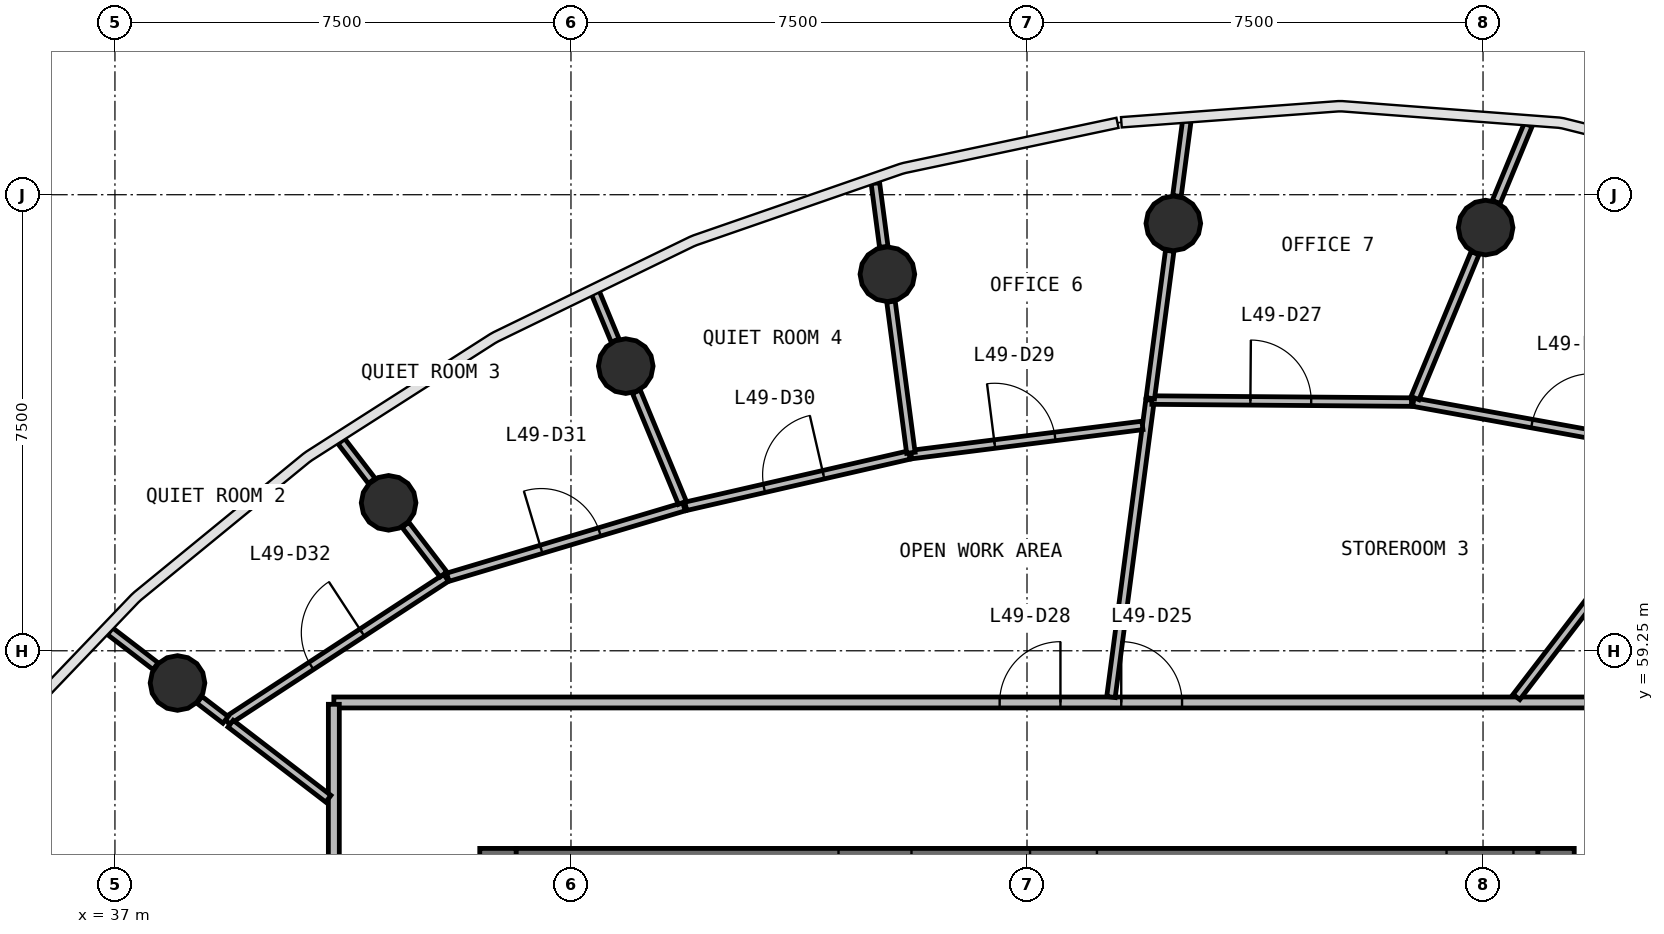
"""IFC4 building model, lengths in metres.
Left out: names, types, materials, properties, quantities, classifications, styles, units other than length and angle.
Written with IfcOpenShell. Run it as: python <this file> out.ifc"""

import sys

from ifc_helpers import new_model, si_unit, direction, frame, frame_2d, origin, origin_2d, place, context, subcontext, project, spatial, rectangle, circle, extrude, source, transform, mapped, element, fill, save


model = new_model("IFC4")
c1 = context("Model", 3, precision=1e-05, world=origin(), true_north=direction((0.0, 1.0)))
c2 = subcontext(c1, "Body", "Model", "MODEL_VIEW")
j1 = project(units=[si_unit("LENGTHUNIT", "METRE"), si_unit("PLANEANGLEUNIT", "RADIAN")], contexts=[c1])
p1 = place(None, origin())
s1 = spatial("IfcSite", under=j1, at=p1, CompositionType="ELEMENT")
p2 = place(p1, origin())
s2 = spatial("IfcBuilding", under=s1, at=p2, CompositionType="ELEMENT")
p3 = place(p2, frame((0.0, 0.0, 203.3)))
s3 = spatial("IfcBuildingStorey", under=s2, at=p3, CompositionType="ELEMENT", Elevation=203.3)
p4 = place(p3, frame((60.7, 40.0, 0.0), z_axis=(0.0, 0.0, 1.0), x_axis=(0.0, 1.0, 0.0)))
e1 = element("IfcWall", 1, at=p4, inside=s3, PredefinedType="SHEAR", context=c2, shape_type="SweptSolid", body=[
    extrude(rectangle(XDim=16.0, YDim=0.6, at=frame_2d((8.0, 0.0))), origin(), (0.0, 0.0, 1.0), 3.9),
])
p5 = place(p4, frame((7.1, 0.0, 0.0)))
e2 = element("IfcOpeningElement", 2, at=p5, cuts=e1, PredefinedType="OPENING", context=c2, shape_type="SweptSolid", body=[
    extrude(rectangle(XDim=1.8, YDim=2.1, at=frame_2d((0.9, 1.05))), frame((0.0, 0.31, 0.0), z_axis=(0.0, -1.0, 0.0), x_axis=(1.0, 0.0, 0.0)), (0.0, 0.0, 1.0), 0.62),
])
p6 = place(p3, frame((43.3, 56.0, 0.0), z_axis=(0.0, 0.0, 1.0), x_axis=(0.0, -1.0, 0.0)))
e3 = element("IfcWall", 3, at=p6, inside=s3, PredefinedType="SHEAR", context=c2, shape_type="SweptSolid", body=[
    extrude(rectangle(XDim=16.0, YDim=0.6, at=frame_2d((8.0, 0.0))), origin(), (0.0, 0.0, 1.0), 3.9),
])
p7 = place(p6, frame((7.1, 0.0, 0.0)))
e4 = element("IfcOpeningElement", 4, at=p7, cuts=e3, PredefinedType="OPENING", context=c2, shape_type="SweptSolid", body=[
    extrude(rectangle(XDim=1.8, YDim=2.1, at=frame_2d((0.9, 1.05))), frame((0.0, 0.31, 0.0), z_axis=(0.0, -1.0, 0.0), x_axis=(1.0, 0.0, 0.0)), (0.0, 0.0, 1.0), 0.62),
])
p8 = place(p3, frame((60.4, 55.7, 0.0), z_axis=(0.0, 0.0, 1.0), x_axis=(-1.0, 0.0, 0.0)))
e5 = element("IfcWall", 5, at=p8, inside=s3, PredefinedType="SHEAR", context=c2, shape_type="SweptSolid", body=[
    extrude(rectangle(XDim=16.8, YDim=0.6, at=frame_2d((8.4, 0.0))), origin(), (0.0, 0.0, 1.0), 3.9),
])
p9 = place(p8, frame((0.4, 0.0, 0.0)))
e6 = element("IfcOpeningElement", 6, at=p9, cuts=e5, PredefinedType="OPENING", context=c2, shape_type="SweptSolid", body=[
    extrude(rectangle(XDim=1.1, YDim=2.1, at=frame_2d((0.55, 1.05))), frame((0.0, 0.31, 0.0), z_axis=(0.0, -1.0, 0.0), x_axis=(1.0, 0.0, 0.0)), (0.0, 0.0, 1.0), 0.62),
])
p10 = place(p8, frame((10.3, 0.0, 0.0)))
e7 = element("IfcOpeningElement", 7, at=p10, cuts=e5, PredefinedType="OPENING", context=c2, shape_type="SweptSolid", body=[
    extrude(rectangle(XDim=1.2, YDim=2.1, at=frame_2d((0.6, 1.05))), frame((0.0, 0.31, 0.0), z_axis=(0.0, -1.0, 0.0), x_axis=(1.0, 0.0, 0.0)), (0.0, 0.0, 1.0), 0.62),
])
p11 = place(p8, frame((7.25, 0.0, 0.0)))
e8 = element("IfcOpeningElement", 8, at=p11, cuts=e5, PredefinedType="OPENING", context=c2, shape_type="SweptSolid", body=[
    extrude(rectangle(XDim=1.1, YDim=2.1, at=frame_2d((0.55, 1.05))), frame((0.0, 0.31, 0.0), z_axis=(0.0, -1.0, 0.0), x_axis=(1.0, 0.0, 0.0)), (0.0, 0.0, 1.0), 0.62),
])
m1 = source(origin(), c2, "Body", "SweptSolid", [
    extrude(circle(Radius=0.45, at=origin_2d()), origin(), (0.0, 0.0, 1.0), 3.9),
])
for number, where, z_axis, x_axis in (
    (9, (59.543, 66.21, 0.0), (0.0, 0.0, 1.0), (1.0, 0.0, 0.0)),
    (10, (54.406, 66.278, 0.0), (0.0, 0.0, 1.0), (1.0, 0.0, 0.0)),
    (11, (49.704, 65.442, 0.0), (0.0, 0.0, 1.0), (1.0, 0.0, 0.0)),
    (12, (45.401, 63.931, 0.0), (0.0, 0.0, 1.0), (1.0, 0.0, 0.0)),
    (13, (41.501, 61.683, 0.0), (0.0, 0.0, 1.0), (1.0, 0.0, 0.0)),
    (14, (38.029, 58.72, 0.0), (0.0, 0.0, 1.0), (1.0, 0.0, 0.0)),
):
    element("IfcColumn", number, at=place(p3, frame(where, z_axis=z_axis, x_axis=x_axis)), inside=s3, PredefinedType="COLUMN", context=c2, shape_type="MappedRepresentation", body=[
        mapped(m1, transform((0.0, 0.0, 0.0), scale=1.0)),
    ])
p12 = place(p3, frame((40.6, 58.4, 0.0), z_axis=(0.0, 0.0, 1.0), x_axis=(1.0, 0.0, 0.0)))
e15 = element("IfcWall", 15, at=p12, inside=s3, PredefinedType="PARTITIONING", context=c2, shape_type="SweptSolid", body=[
    extrude(rectangle(XDim=22.8, YDim=0.18, at=frame_2d((11.4, 0.0))), origin(), (0.0, 0.0, 1.0), 2.88),
])
p13 = place(p12, frame((12.95, 0.0, 0.0)))
e16 = element("IfcOpeningElement", 16, at=p13, cuts=e15, PredefinedType="OPENING", context=c2, shape_type="SweptSolid", body=[
    extrude(rectangle(XDim=1.0, YDim=2.1, at=frame_2d((0.5, 1.05))), frame((0.0, 0.1, 0.0), z_axis=(0.0, -1.0, 0.0), x_axis=(1.0, 0.0, 0.0)), (0.0, 0.0, 1.0), 0.2),
])
p14 = place(p12, frame((10.95, 0.0, 0.0)))
e17 = element("IfcOpeningElement", 17, at=p14, cuts=e15, PredefinedType="OPENING", context=c2, shape_type="SweptSolid", body=[
    extrude(rectangle(XDim=1.0, YDim=2.1, at=frame_2d((0.5, 1.05))), frame((0.0, 0.1, 0.0), z_axis=(0.0, -1.0, 0.0), x_axis=(1.0, 0.0, 0.0)), (0.0, 0.0, 1.0), 0.2),
])
p15 = place(p3, frame((40.6, 37.63, 0.0), z_axis=(0.0, 0.0, 1.0), x_axis=(0.0, 1.0, 0.0)))
e18 = element("IfcWall", 18, at=p15, inside=s3, PredefinedType="PARTITIONING", context=c2, shape_type="SweptSolid", body=[
    extrude(rectangle(XDim=20.74, YDim=0.18, at=frame_2d((10.37, 0.0))), origin(), (0.0, 0.0, 1.0), 2.88),
])
p16 = place(p15, frame((9.89, 0.0, 0.0)))
e19 = element("IfcOpeningElement", 19, at=p16, cuts=e18, PredefinedType="OPENING", context=c2, shape_type="SweptSolid", body=[
    extrude(rectangle(XDim=1.0, YDim=2.1, at=frame_2d((0.5, 1.05))), frame((0.0, 0.1, 0.0), z_axis=(0.0, -1.0, 0.0), x_axis=(1.0, 0.0, 0.0)), (0.0, 0.0, 1.0), 0.2),
])
p17 = place(p15, frame((4.29, 0.0, 0.0)))
e20 = element("IfcOpeningElement", 20, at=p17, cuts=e18, PredefinedType="OPENING", context=c2, shape_type="SweptSolid", body=[
    extrude(rectangle(XDim=1.0, YDim=2.1, at=frame_2d((0.5, 1.05))), frame((0.0, 0.1, 0.0), z_axis=(0.0, -1.0, 0.0), x_axis=(1.0, 0.0, 0.0)), (0.0, 0.0, 1.0), 0.2),
])
p18 = place(p3, frame((53.381, 58.49, 0.0), z_axis=(0.0, 0.0, 1.0), x_axis=(0.130510929427, 0.991446870639, 0.0)))
e21 = element("IfcWall", 21, at=p18, inside=s3, PredefinedType="PARTITIONING", context=c2, shape_type="SweptSolid", body=[
    extrude(rectangle(XDim=4.926, YDim=0.14, at=frame_2d((2.463, 0.0))), origin(), (0.0, 0.0, 1.0), 2.88),
])
p19 = place(p3, frame((58.354, 63.339, 0.0), z_axis=(0.0, 0.0, 1.0), x_axis=(0.983980456021, -0.178276364581, 0.0)))
e22 = element("IfcWall", 22, at=p19, inside=s3, PredefinedType="PARTITIONING", context=c2, shape_type="SweptSolid", body=[
    extrude(rectangle(XDim=4.833, YDim=0.14, at=frame_2d((2.417, 0.0))), origin(), (0.0, 0.0, 1.0), 2.88),
])
p20 = place(p19, frame((1.983, 0.0, 0.0)))
e23 = element("IfcOpeningElement", 23, at=p20, cuts=e22, PredefinedType="OPENING", context=c2, shape_type="SweptSolid", body=[
    extrude(rectangle(XDim=1.0, YDim=2.1, at=frame_2d((0.5, 1.05))), frame((0.0, 0.08, 0.0), z_axis=(0.0, -1.0, 0.0), x_axis=(1.0, 0.0, 0.0)), (0.0, 0.0, 1.0), 0.16),
])
p21 = place(p3, frame((54.054, 63.373, 0.0), z_axis=(0.0, 0.0, 1.0), x_axis=(0.999969319587, -0.007833255005, 0.0)))
e24 = element("IfcWall", 24, at=p21, inside=s3, PredefinedType="PARTITIONING", context=c2, shape_type="SweptSolid", body=[
    extrude(rectangle(XDim=4.27, YDim=0.14, at=frame_2d((2.135, 0.0))), origin(), (0.0, 0.0, 1.0), 2.88),
])
p22 = place(p21, frame((1.62, 0.0, 0.0)))
e25 = element("IfcOpeningElement", 25, at=p22, cuts=e24, PredefinedType="OPENING", context=c2, shape_type="SweptSolid", body=[
    extrude(rectangle(XDim=1.0, YDim=2.1, at=frame_2d((0.5, 1.05))), frame((0.0, 0.08, 0.0), z_axis=(0.0, -1.0, 0.0), x_axis=(1.0, 0.0, 0.0)), (0.0, 0.0, 1.0), 0.16),
])
p23 = place(p3, frame((38.843, 58.096, 0.0), z_axis=(0.0, 0.0, 1.0), x_axis=(0.83707650684, 0.547085844907, 0.0)))
e26 = element("IfcWall", 26, at=p23, inside=s3, PredefinedType="PARTITIONING", context=c2, shape_type="SweptSolid", body=[
    extrude(rectangle(XDim=4.305, YDim=0.14, at=frame_2d((2.152, 0.0))), origin(), (0.0, 0.0, 1.0), 2.88),
])
p24 = place(p23, frame((1.655, 0.0, 0.0)))
e27 = element("IfcOpeningElement", 27, at=p24, cuts=e26, PredefinedType="OPENING", context=c2, shape_type="SweptSolid", body=[
    extrude(rectangle(XDim=1.0, YDim=2.1, at=frame_2d((0.5, 1.05))), frame((0.0, 0.08, 0.0), z_axis=(0.0, -1.0, 0.0), x_axis=(1.0, 0.0, 0.0)), (0.0, 0.0, 1.0), 0.16),
])
p25 = place(p3, frame((42.475, 60.459, 0.0), z_axis=(0.0, 0.0, 1.0), x_axis=(0.958218274214, 0.286038002655, 0.0)))
e28 = element("IfcWall", 28, at=p25, inside=s3, PredefinedType="PARTITIONING", context=c2, shape_type="SweptSolid", body=[
    extrude(rectangle(XDim=4.053, YDim=0.14, at=frame_2d((2.027, 0.0))), origin(), (0.0, 0.0, 1.0), 2.88),
])
p26 = place(p25, frame((1.603, 0.0, 0.0)))
e29 = element("IfcOpeningElement", 29, at=p26, cuts=e28, PredefinedType="OPENING", context=c2, shape_type="SweptSolid", body=[
    extrude(rectangle(XDim=1.0, YDim=2.1, at=frame_2d((0.5, 1.05))), frame((0.0, 0.08, 0.0), z_axis=(0.0, -1.0, 0.0), x_axis=(1.0, 0.0, 0.0)), (0.0, 0.0, 1.0), 0.16),
])
p27 = place(p3, frame((50.094, 62.476, 0.0), z_axis=(0.0, 0.0, 1.0), x_axis=(0.99213420041, 0.12517878565, 0.0)))
e30 = element("IfcWall", 30, at=p27, inside=s3, PredefinedType="PARTITIONING", context=c2, shape_type="SweptSolid", body=[
    extrude(rectangle(XDim=3.834, YDim=0.14, at=frame_2d((1.917, 0.0))), origin(), (0.0, 0.0, 1.0), 2.88),
])
p28 = place(p27, frame((1.385, 0.0, 0.0)))
e31 = element("IfcOpeningElement", 31, at=p28, cuts=e30, PredefinedType="OPENING", context=c2, shape_type="SweptSolid", body=[
    extrude(rectangle(XDim=1.0, YDim=2.1, at=frame_2d((0.5, 1.05))), frame((0.0, 0.08, 0.0), z_axis=(0.0, -1.0, 0.0), x_axis=(1.0, 0.0, 0.0)), (0.0, 0.0, 1.0), 0.16),
])
p29 = place(p3, frame((46.388, 61.626, 0.0), z_axis=(0.0, 0.0, 1.0), x_axis=(0.974668578249, 0.223654113699, 0.0)))
e32 = element("IfcWall", 32, at=p29, inside=s3, PredefinedType="PARTITIONING", context=c2, shape_type="SweptSolid", body=[
    extrude(rectangle(XDim=3.772, YDim=0.14, at=frame_2d((1.886, 0.0))), origin(), (0.0, 0.0, 1.0), 2.88),
])
p30 = place(p29, frame((1.323, 0.0, 0.0)))
e33 = element("IfcOpeningElement", 33, at=p30, cuts=e32, PredefinedType="OPENING", context=c2, shape_type="SweptSolid", body=[
    extrude(rectangle(XDim=1.0, YDim=2.1, at=frame_2d((0.5, 1.05))), frame((0.0, 0.08, 0.0), z_axis=(0.0, -1.0, 0.0), x_axis=(1.0, 0.0, 0.0)), (0.0, 0.0, 1.0), 0.16),
])
p31 = place(p3, frame((60.049, 58.49, 0.0), z_axis=(0.0, 0.0, 1.0), x_axis=(0.60875050296, 0.793361724024, 0.0)))
e34 = element("IfcWall", 34, at=p31, inside=s3, PredefinedType="PARTITIONING", context=c2, shape_type="SweptSolid", body=[
    extrude(rectangle(XDim=3.663, YDim=0.14, at=frame_2d((1.832, 0.0))), origin(), (0.0, 0.0, 1.0), 2.88),
])
p32 = place(p3, frame((54.028, 63.403, 0.0), z_axis=(0.0, 0.0, 1.0), x_axis=(0.130581052229, 0.991437637373, 0.0)))
e35 = element("IfcWall", 35, at=p32, inside=s3, PredefinedType="PARTITIONING", context=c2, shape_type="SweptSolid", body=[
    extrude(rectangle(XDim=2.446, YDim=0.14, at=frame_2d((1.223, 0.0))), origin(), (0.0, 0.0, 1.0), 2.88),
])
p33 = place(p3, frame((38.39, 58.444, 0.0), z_axis=(0.0, 0.0, 1.0), x_axis=(0.793294129055, -0.608838586825, 0.0)))
e36 = element("IfcWall", 36, at=p33, inside=s3, PredefinedType="PARTITIONING", context=c2, shape_type="SweptSolid", body=[
    extrude(rectangle(XDim=0.541, YDim=0.14, at=frame_2d((0.271, 0.0))), origin(), (0.0, 0.0, 1.0), 2.88),
])
p34 = place(p3, frame((38.902, 58.051, 0.0), z_axis=(0.0, 0.0, 1.0), x_axis=(0.7933756116, -0.608732403374, 0.0)))
e37 = element("IfcWall", 37, at=p34, inside=s3, PredefinedType="PARTITIONING", context=c2, shape_type="SweptSolid", body=[
    extrude(rectangle(XDim=2.027, YDim=0.14, at=frame_2d((1.013, 0.0))), origin(), (0.0, 0.0, 1.0), 2.88),
])
p35 = place(p3, frame((58.381, 63.406, 0.0), z_axis=(0.0, 0.0, 1.0), x_axis=(0.382733405642, 0.923858831319, 0.0)))
e38 = element("IfcWall", 38, at=p35, inside=s3, PredefinedType="PARTITIONING", context=c2, shape_type="SweptSolid", body=[
    extrude(rectangle(XDim=2.58, YDim=0.14, at=frame_2d((1.29, 0.0))), origin(), (0.0, 0.0, 1.0), 2.88),
])
p36 = place(p3, frame((50.09, 62.506, 0.0), z_axis=(0.0, 0.0, 1.0), x_axis=(-0.130479700893, 0.991450980964, 0.0)))
e39 = element("IfcWall", 39, at=p36, inside=s3, PredefinedType="PARTITIONING", context=c2, shape_type="SweptSolid", body=[
    extrude(rectangle(XDim=2.507, YDim=0.14, at=frame_2d((1.254, 0.0))), origin(), (0.0, 0.0, 1.0), 2.88),
])
p37 = place(p3, frame((46.332, 61.684, 0.0), z_axis=(0.0, 0.0, 1.0), x_axis=(-0.382624406385, 0.923903979664, 0.0)))
e40 = element("IfcWall", 40, at=p37, inside=s3, PredefinedType="PARTITIONING", context=c2, shape_type="SweptSolid", body=[
    extrude(rectangle(XDim=1.977, YDim=0.14, at=frame_2d((0.989, 0.0))), origin(), (0.0, 0.0, 1.0), 2.88),
])
p38 = place(p3, frame((59.717, 66.63, 0.0), z_axis=(0.0, 0.0, 1.0), x_axis=(0.382733825207, 0.923858657502, 0.0)))
e41 = element("IfcWall", 41, at=p38, inside=s3, PredefinedType="PARTITIONING", context=c2, shape_type="SweptSolid", body=[
    extrude(rectangle(XDim=1.373, YDim=0.14, at=frame_2d((0.687, 0.0))), origin(), (0.0, 0.0, 1.0), 2.88),
])
p39 = place(p3, frame((54.466, 66.729, 0.0), z_axis=(0.0, 0.0, 1.0), x_axis=(0.130520415919, 0.991445621821, 0.0)))
e42 = element("IfcWall", 42, at=p39, inside=s3, PredefinedType="PARTITIONING", context=c2, shape_type="SweptSolid", body=[
    extrude(rectangle(XDim=1.246, YDim=0.14, at=frame_2d((0.623, 0.0))), origin(), (0.0, 0.0, 1.0), 2.88),
])
p40 = place(p3, frame((42.403, 60.507, 0.0), z_axis=(0.0, 0.0, 1.0), x_axis=(-0.608700642645, 0.793399979609, 0.0)))
e43 = element("IfcWall", 43, at=p40, inside=s3, PredefinedType="PARTITIONING", context=c2, shape_type="SweptSolid", body=[
    extrude(rectangle(XDim=1.028, YDim=0.14, at=frame_2d((0.514, 0.0))), origin(), (0.0, 0.0, 1.0), 2.88),
])
p41 = place(p3, frame((49.644, 65.893, 0.0), z_axis=(0.0, 0.0, 1.0), x_axis=(-0.130436565077, 0.99145665689, 0.0)))
e44 = element("IfcWall", 44, at=p41, inside=s3, PredefinedType="PARTITIONING", context=c2, shape_type="SweptSolid", body=[
    extrude(rectangle(XDim=1.056, YDim=0.14, at=frame_2d((0.528, 0.0))), origin(), (0.0, 0.0, 1.0), 2.88),
])
p42 = place(p3, frame((37.668, 58.997, 0.0), z_axis=(0.0, 0.0, 1.0), x_axis=(-0.793344167197, 0.608773383431, 0.0)))
e45 = element("IfcWall", 45, at=p42, inside=s3, PredefinedType="PARTITIONING", context=c2, shape_type="SweptSolid", body=[
    extrude(rectangle(XDim=0.944, YDim=0.14, at=frame_2d((0.472, 0.0))), origin(), (0.0, 0.0, 1.0), 2.88),
])
p43 = place(p3, frame((45.227, 64.352, 0.0), z_axis=(0.0, 0.0, 1.0), x_axis=(-0.382754217383, 0.92385020922, 0.0)))
e46 = element("IfcWall", 46, at=p43, inside=s3, PredefinedType="PARTITIONING", context=c2, shape_type="SweptSolid", body=[
    extrude(rectangle(XDim=0.857, YDim=0.14, at=frame_2d((0.429, 0.0))), origin(), (0.0, 0.0, 1.0), 2.88),
])
p44 = place(p3, frame((41.224, 62.044, 0.0), z_axis=(0.0, 0.0, 1.0), x_axis=(-0.608936045201, 0.793219322038, 0.0)))
e47 = element("IfcWall", 47, at=p44, inside=s3, PredefinedType="PARTITIONING", context=c2, shape_type="SweptSolid", body=[
    extrude(rectangle(XDim=0.823, YDim=0.14, at=frame_2d((0.411, 0.0))), origin(), (0.0, 0.0, 1.0), 2.88),
])
m2 = source(origin(), c2, "Body", "SweptSolid", [
    extrude(rectangle(XDim=1.0, YDim=2.1, at=frame_2d((0.5, 1.05))), frame((0.0, 0.025, 0.0), z_axis=(0.0, -1.0, 0.0), x_axis=(1.0, 0.0, 0.0)), (0.0, 0.0, 1.0), 0.05),
])
p45 = place(p13, origin())
e48 = element("IfcDoor", 48, at=p45, inside=s3, OperationType="SINGLE_SWING_LEFT", PredefinedType="DOOR", context=c2, shape_type="MappedRepresentation", body=[
    mapped(m2, transform((0.0, 0.0, 0.0), scale=1.0)),
])
fill(e16, e48)
p46 = place(p20, origin())
e49 = element("IfcDoor", 49, at=p46, inside=s3, OperationType="SINGLE_SWING_RIGHT", PredefinedType="DOOR", context=c2, shape_type="MappedRepresentation", body=[
    mapped(m2, transform((0.0, 0.0, 0.0), scale=1.0)),
])
fill(e23, e49)
p47 = place(p22, origin())
e50 = element("IfcDoor", 50, at=p47, inside=s3, OperationType="SINGLE_SWING_LEFT", PredefinedType="DOOR", context=c2, shape_type="MappedRepresentation", body=[
    mapped(m2, transform((0.0, 0.0, 0.0), scale=1.0)),
])
fill(e25, e50)
p48 = place(p14, origin())
e51 = element("IfcDoor", 51, at=p48, inside=s3, OperationType="SINGLE_SWING_RIGHT", PredefinedType="DOOR", context=c2, shape_type="MappedRepresentation", body=[
    mapped(m2, transform((0.0, 0.0, 0.0), scale=1.0)),
])
fill(e17, e51)
p49 = place(p28, origin())
e52 = element("IfcDoor", 52, at=p49, inside=s3, OperationType="SINGLE_SWING_LEFT", PredefinedType="DOOR", context=c2, shape_type="MappedRepresentation", body=[
    mapped(m2, transform((0.0, 0.0, 0.0), scale=1.0)),
])
fill(e31, e52)
p50 = place(p30, origin())
e53 = element("IfcDoor", 53, at=p50, inside=s3, OperationType="SINGLE_SWING_RIGHT", PredefinedType="DOOR", context=c2, shape_type="MappedRepresentation", body=[
    mapped(m2, transform((0.0, 0.0, 0.0), scale=1.0)),
])
fill(e33, e53)
p51 = place(p26, origin())
e54 = element("IfcDoor", 54, at=p51, inside=s3, OperationType="SINGLE_SWING_LEFT", PredefinedType="DOOR", context=c2, shape_type="MappedRepresentation", body=[
    mapped(m2, transform((0.0, 0.0, 0.0), scale=1.0)),
])
fill(e29, e54)
p52 = place(p24, origin())
e55 = element("IfcDoor", 55, at=p52, inside=s3, OperationType="SINGLE_SWING_RIGHT", PredefinedType="DOOR", context=c2, shape_type="MappedRepresentation", body=[
    mapped(m2, transform((0.0, 0.0, 0.0), scale=1.0)),
])
fill(e27, e55)
save(model, sys.argv[1])
